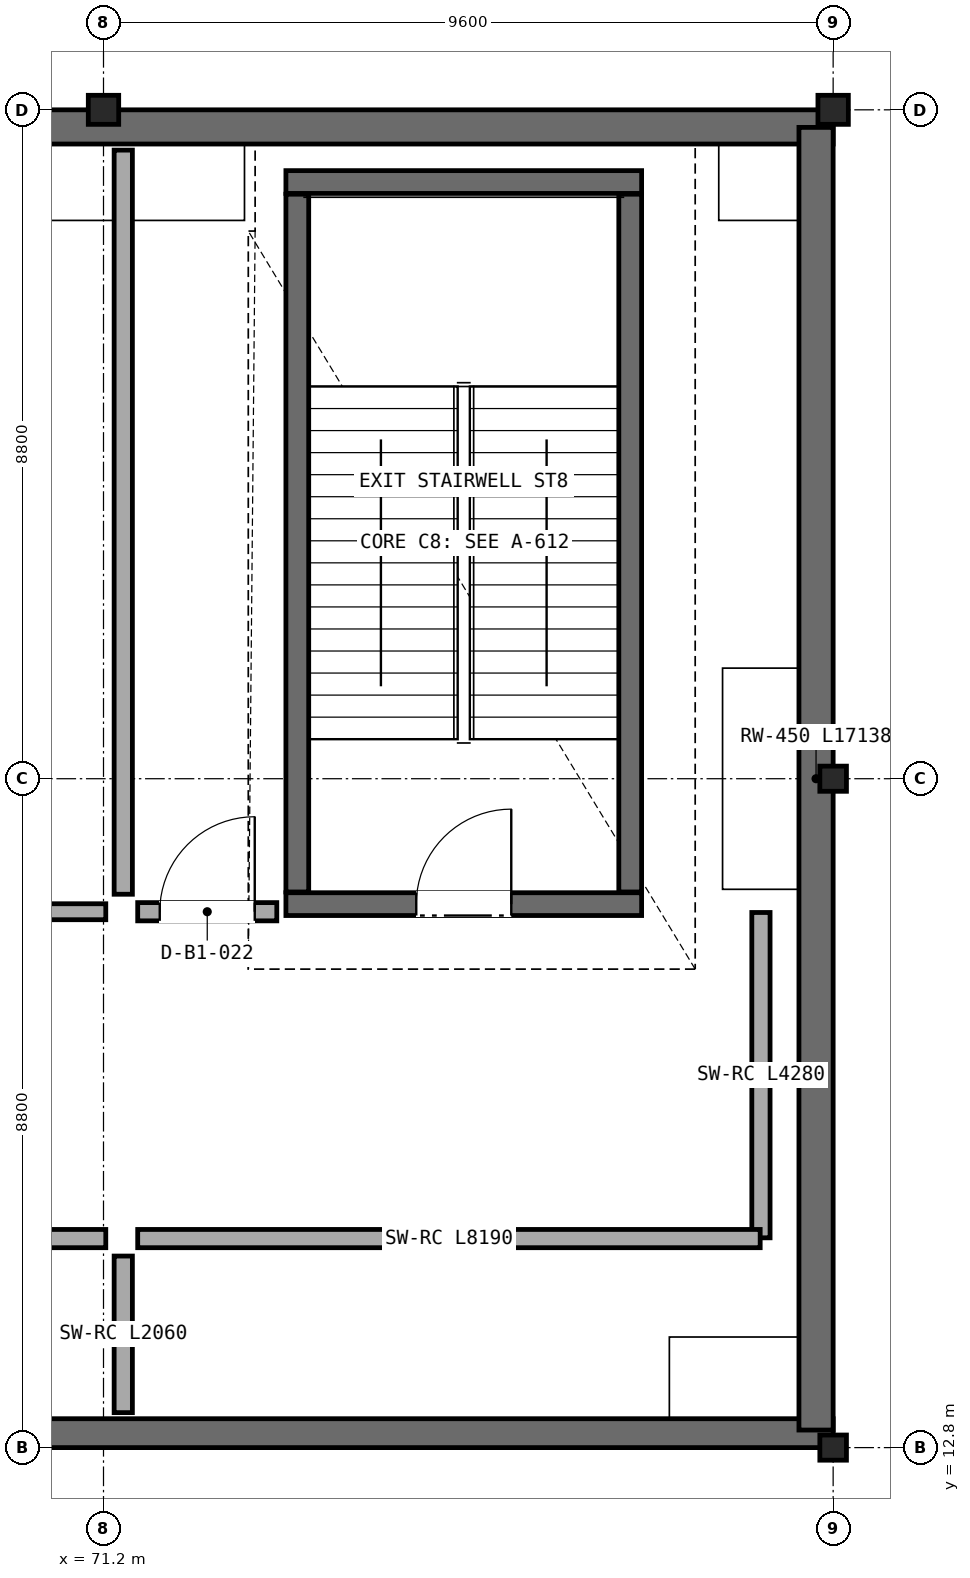
"""IFC4 building model, lengths in metres.
Left out: names, types, materials, properties, quantities, classifications, styles, units other than length and angle.
Written with IfcOpenShell. Run it as: python <this file> out.ifc"""

import sys

from ifc_helpers import new_model, si_unit, direction, frame, frame_2d, origin, origin_2d, place, context, subcontext, project, spatial, rectangle, i_section, extrude, element, fill, save


model = new_model("IFC4")
c1 = context("Model", 3, precision=1e-05, world=origin(), true_north=direction((0.0, 1.0)))
c2 = subcontext(c1, "Body", "Model", "MODEL_VIEW")
j1 = project(units=[si_unit("LENGTHUNIT", "METRE"), si_unit("PLANEANGLEUNIT", "RADIAN")], contexts=[c1])
p1 = place(None, origin())
s1 = spatial("IfcSite", under=j1, at=p1, CompositionType="ELEMENT")
p2 = place(p1, origin())
s2 = spatial("IfcBuilding", under=s1, at=p2, CompositionType="ELEMENT")
p3 = place(p2, frame((0.0, 0.0, -5.4)))
s3 = spatial("IfcBuildingStorey", under=s2, at=p3, CompositionType="ELEMENT", Elevation=-5.4)
p4 = place(p3, frame((71.2, 30.4, 0.0), z_axis=(0.0, 0.0, 1.0), x_axis=(1.0, 0.0, 0.0)))
e1 = element("IfcColumn", 1, at=p4, inside=s3, PredefinedType="COLUMN", context=c2, shape_type="SweptSolid", body=[
    extrude(i_section(OverallWidth=0.4, OverallDepth=0.382, WebThickness=0.025, FlangeThickness=0.036, at=origin_2d()), origin(), (0.0, 0.0, 1.0), 5.4),
])
for number, where, z_axis, x_axis in (
    (2, (80.8, 12.8, 0.0), (0.0, 0.0, 1.0), (1.0, 0.0, 0.0)),
    (3, (80.8, 21.6, 0.0), (0.0, 0.0, 1.0), (1.0, 0.0, 0.0)),
):
    element("IfcColumn", number, at=place(p3, frame(where, z_axis=z_axis, x_axis=x_axis)), inside=s3, PredefinedType="COLUMN", context=c2, shape_type="SweptSolid", body=[
        extrude(i_section(OverallWidth=0.35, OverallDepth=0.331, WebThickness=0.02, FlangeThickness=0.028, at=origin_2d()), origin(), (0.0, 0.0, 1.0), 5.4),
    ])
p5 = place(p3, frame((80.8, 30.4, 0.0), z_axis=(0.0, 0.0, 1.0), x_axis=(1.0, 0.0, 0.0)))
e4 = element("IfcColumn", 4, at=p5, inside=s3, PredefinedType="COLUMN", context=c2, shape_type="SweptSolid", body=[
    extrude(i_section(OverallWidth=0.4, OverallDepth=0.382, WebThickness=0.025, FlangeThickness=0.036, at=origin_2d()), origin(), (0.0, 0.0, 1.0), 5.4),
])
p6 = place(p3, frame((80.8, 30.175, 0.0), z_axis=(0.0, 0.0, 1.0), x_axis=(-1.0, 0.0, 0.0)))
e5 = element("IfcWall", 5, at=p6, inside=s3, PredefinedType="USERDEFINED", context=c2, shape_type="SweptSolid", body=[
    extrude(rectangle(XDim=28.8, YDim=0.45, at=frame_2d((14.4, 0.0))), origin(), (0.0, 0.0, 1.0), 5.06),
])
p7 = place(p3, frame((52.0, 12.99, 0.0), z_axis=(0.0, 0.0, 1.0), x_axis=(1.0, 0.0, 0.0)))
e6 = element("IfcWall", 6, at=p7, inside=s3, PredefinedType="USERDEFINED", context=c2, shape_type="SweptSolid", body=[
    extrude(rectangle(XDim=28.8, YDim=0.38, at=frame_2d((14.4, 0.0))), origin(), (0.0, 0.0, 1.0), 5.06),
])
p8 = place(p3, frame((80.575, 13.031, 0.0), z_axis=(0.0, 0.0, 1.0), x_axis=(0.0, 1.0, 0.0)))
e7 = element("IfcWall", 7, at=p8, inside=s3, PredefinedType="USERDEFINED", context=c2, shape_type="SweptSolid", body=[
    extrude(rectangle(XDim=17.138, YDim=0.45, at=frame_2d((8.569, 0.0))), origin(), (0.0, 0.0, 1.0), 5.06),
])
p9 = place(p3, frame((73.6, 19.95, 0.0), z_axis=(0.0, 0.0, 1.0), x_axis=(1.0, 0.0, 0.0)))
e8 = element("IfcWall", 8, at=p9, inside=s3, PredefinedType="SHEAR", context=c2, shape_type="SweptSolid", body=[
    extrude(rectangle(XDim=4.68, YDim=0.3, at=frame_2d((2.34, 0.0))), origin(), (0.0, 0.0, 1.0), 5.075),
])
p10 = place(p9, frame((1.715, 0.0, 0.0)))
e9 = element("IfcOpeningElement", 9, at=p10, cuts=e8, PredefinedType="OPENING", context=c2, shape_type="SweptSolid", body=[
    extrude(rectangle(XDim=1.25, YDim=2.2, at=frame_2d((0.625, 1.1))), frame((0.0, 0.16, 0.0), z_axis=(0.0, -1.0, 0.0), x_axis=(1.0, 0.0, 0.0)), (0.0, 0.0, 1.0), 0.32),
])
p11 = place(p3, frame((78.28, 29.45, 0.0), z_axis=(0.0, 0.0, 1.0), x_axis=(-1.0, 0.0, 0.0)))
e10 = element("IfcWall", 10, at=p11, inside=s3, PredefinedType="SHEAR", context=c2, shape_type="SweptSolid", body=[
    extrude(rectangle(XDim=4.68, YDim=0.3, at=frame_2d((2.34, 0.0))), origin(), (0.0, 0.0, 1.0), 5.075),
])
for number, where, z_axis, x_axis in (
    (11, (78.13, 20.11, 0.0), (0.0, 0.0, 1.0), (0.0, 1.0, 0.0)),
    (12, (73.75, 29.29, 0.0), (0.0, 0.0, 1.0), (0.0, -1.0, 0.0)),
):
    element("IfcWall", number, at=place(p3, frame(where, z_axis=z_axis, x_axis=x_axis)), inside=s3, PredefinedType="SHEAR", context=c2, shape_type="SweptSolid", body=[
        extrude(rectangle(XDim=9.18, YDim=0.3, at=frame_2d((4.59, 0.0))), origin(), (0.0, 0.0, 1.0), 5.075),
    ])
p12 = place(p3, frame((52.45, 15.55, 0.0), z_axis=(0.0, 0.0, 1.0), x_axis=(1.0, 0.0, 0.0)))
e13 = element("IfcWall", 13, at=p12, inside=s3, PredefinedType="SOLIDWALL", context=c2, shape_type="SweptSolid", body=[
    extrude(rectangle(XDim=18.78, YDim=0.24, at=frame_2d((9.39, 0.0))), origin(), (0.0, 0.0, 1.0), 5.03),
])
p13 = place(p12, frame((8.765, 0.0, 0.0)))
e14 = element("IfcOpeningElement", 14, at=p13, cuts=e13, PredefinedType="OPENING", context=c2, shape_type="SweptSolid", body=[
    extrude(rectangle(XDim=1.25, YDim=2.2, at=frame_2d((0.625, 1.1))), frame((0.0, 0.13, 0.0), z_axis=(0.0, -1.0, 0.0), x_axis=(1.0, 0.0, 0.0)), (0.0, 0.0, 1.0), 0.26),
])
p14 = place(p3, frame((71.23, 19.85, 0.0), z_axis=(0.0, 0.0, 1.0), x_axis=(-1.0, 0.0, 0.0)))
e15 = element("IfcWall", 15, at=p14, inside=s3, PredefinedType="PARTITIONING", context=c2, shape_type="SweptSolid", body=[
    extrude(rectangle(XDim=18.78, YDim=0.21, at=frame_2d((9.39, 0.0))), origin(), (0.0, 0.0, 1.0), 5.03),
])
p15 = place(p14, frame((8.865, 0.0, 0.0)))
e16 = element("IfcOpeningElement", 16, at=p15, cuts=e15, PredefinedType="OPENING", context=c2, shape_type="SweptSolid", body=[
    extrude(rectangle(XDim=1.05, YDim=2.15, at=frame_2d((0.525, 1.075))), frame((0.0, 0.115, 0.0), z_axis=(0.0, -1.0, 0.0), x_axis=(1.0, 0.0, 0.0)), (0.0, 0.0, 1.0), 0.23),
])
p16 = place(p3, frame((79.85, 15.56, 0.0), z_axis=(0.0, 0.0, 1.0), x_axis=(0.0, 1.0, 0.0)))
e17 = element("IfcWall", 17, at=p16, inside=s3, PredefinedType="SOLIDWALL", context=c2, shape_type="SweptSolid", body=[
    extrude(rectangle(XDim=4.28, YDim=0.24, at=frame_2d((2.14, 0.0))), origin(), (0.0, 0.0, 1.0), 5.03),
])
p17 = place(p3, frame((73.48, 19.85, 0.0), z_axis=(0.0, 0.0, 1.0), x_axis=(-1.0, 0.0, 0.0)))
e18 = element("IfcWall", 18, at=p17, inside=s3, PredefinedType="SOLIDWALL", context=c2, shape_type="SweptSolid", body=[
    extrude(rectangle(XDim=1.83, YDim=0.24, at=frame_2d((0.915, 0.0))), origin(), (0.0, 0.0, 1.0), 5.03),
])
p18 = place(p17, frame((0.29, 0.0, 0.0)))
e19 = element("IfcOpeningElement", 19, at=p18, cuts=e18, PredefinedType="OPENING", context=c2, shape_type="SweptSolid", body=[
    extrude(rectangle(XDim=1.25, YDim=2.2, at=frame_2d((0.625, 1.1))), frame((0.0, 0.13, 0.0), z_axis=(0.0, -1.0, 0.0), x_axis=(1.0, 0.0, 0.0)), (0.0, 0.0, 1.0), 0.26),
])
p19 = place(p3, frame((71.65, 15.55, 0.0), z_axis=(0.0, 0.0, 1.0), x_axis=(1.0, 0.0, 0.0)))
e20 = element("IfcWall", 20, at=p19, inside=s3, PredefinedType="SOLIDWALL", context=c2, shape_type="SweptSolid", body=[
    extrude(rectangle(XDim=8.19, YDim=0.24, at=frame_2d((4.095, 0.0))), origin(), (0.0, 0.0, 1.0), 5.03),
])
p20 = place(p3, frame((71.46, 15.32, 0.0), z_axis=(0.0, 0.0, 1.0), x_axis=(0.0, -1.0, 0.0)))
e21 = element("IfcWall", 21, at=p20, inside=s3, PredefinedType="SOLIDWALL", context=c2, shape_type="SweptSolid", body=[
    extrude(rectangle(XDim=2.06, YDim=0.24, at=frame_2d((1.03, 0.0))), origin(), (0.0, 0.0, 1.0), 5.03),
])
p21 = place(p3, frame((71.46, 29.87, 0.0), z_axis=(0.0, 0.0, 1.0), x_axis=(0.0, -1.0, 0.0)))
e22 = element("IfcWall", 22, at=p21, inside=s3, PredefinedType="SOLIDWALL", context=c2, shape_type="SweptSolid", body=[
    extrude(rectangle(XDim=9.79, YDim=0.24, at=frame_2d((4.895, 0.0))), origin(), (0.0, 0.0, 1.0), 5.03),
])
p22 = place(p10, origin())
e23 = element("IfcDoor", 23, at=p22, inside=s3, OperationType="SINGLE_SWING_RIGHT", PredefinedType="DOOR", context=c2, shape_type="SweptSolid", body=[
    extrude(rectangle(XDim=1.25, YDim=2.2, at=frame_2d((0.625, 1.1))), frame((0.0, 0.025, 0.0), z_axis=(0.0, -1.0, 0.0), x_axis=(1.0, 0.0, 0.0)), (0.0, 0.0, 1.0), 0.05),
])
fill(e9, e23)
p23 = place(p18, frame((1.25, 0.0, 0.0), z_axis=(0.0, 0.0, 1.0), x_axis=(-1.0, 0.0, 0.0)))
e24 = element("IfcDoor", 24, at=p23, inside=s3, OperationType="SINGLE_SWING_LEFT", PredefinedType="DOOR", context=c2, shape_type="SweptSolid", body=[
    extrude(rectangle(XDim=1.25, YDim=2.2, at=frame_2d((0.625, 1.1))), frame((0.0, 0.025, 0.0), z_axis=(0.0, -1.0, 0.0), x_axis=(1.0, 0.0, 0.0)), (0.0, 0.0, 1.0), 0.05),
])
fill(e19, e24)
save(model, sys.argv[1])
